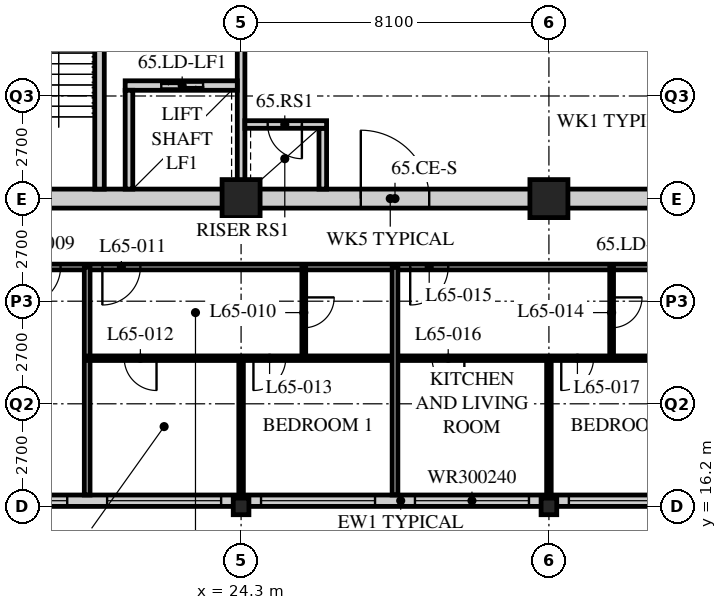
"""IFC4 building model, lengths in metres.
Left out: names, types, materials, properties, quantities, classifications, styles, units other than length and angle.
Written with IfcOpenShell. Run it as: python <this file> out.ifc"""

import sys

from ifc_helpers import new_model, si_unit, direction, frame, frame_2d, origin, origin_2d, place, context, subcontext, project, spatial, rectangle, hollow_rectangle, i_section, extrude, element, fill, save


model = new_model("IFC4")
c1 = context("Model", 3, precision=1e-05, world=origin(), true_north=direction((0.0, 1.0)))
c2 = subcontext(c1, "Body", "Model", "MODEL_VIEW")
j1 = project(units=[si_unit("LENGTHUNIT", "METRE"), si_unit("PLANEANGLEUNIT", "RADIAN")], contexts=[c1])
p1 = place(None, origin())
s1 = spatial("IfcSite", under=j1, at=p1, CompositionType="ELEMENT")
p2 = place(p1, origin())
s2 = spatial("IfcBuilding", under=s1, at=p2, CompositionType="ELEMENT")
p3 = place(p2, frame((0.0, 0.0, 254.1)))
s3 = spatial("IfcBuildingStorey", under=s2, at=p3, CompositionType="ELEMENT", Elevation=254.1)
p4 = place(p3, frame((24.3, 16.2, 0.0), z_axis=(0.0, 0.0, 1.0), x_axis=(1.0, 0.0, 0.0)))
e1 = element("IfcColumn", 1, at=p4, inside=s3, PredefinedType="COLUMN", context=c2, shape_type="SweptSolid", body=[
    extrude(i_section(OverallWidth=0.412, OverallDepth=0.437, WebThickness=0.036, FlangeThickness=0.058, FilletRadius=0.015, at=origin_2d()), origin(), (0.0, 0.0, 1.0), 3.9),
])
p5 = place(p3, frame((24.3, 24.3, 0.0), z_axis=(0.0, 0.0, 1.0), x_axis=(1.0, 0.0, 0.0)))
e2 = element("IfcColumn", 2, at=p5, inside=s3, PredefinedType="COLUMN", context=c2, shape_type="SweptSolid", body=[
    extrude(hollow_rectangle(XDim=1.0, YDim=1.0, WallThickness=0.1, at=origin_2d()), origin(), (0.0, 0.0, 1.0), 3.9),
])
p6 = place(p3, frame((32.4, 16.2, 0.0), z_axis=(0.0, 0.0, 1.0), x_axis=(1.0, 0.0, 0.0)))
e3 = element("IfcColumn", 3, at=p6, inside=s3, PredefinedType="COLUMN", context=c2, shape_type="SweptSolid", body=[
    extrude(i_section(OverallWidth=0.412, OverallDepth=0.437, WebThickness=0.036, FlangeThickness=0.058, FilletRadius=0.015, at=origin_2d()), origin(), (0.0, 0.0, 1.0), 3.9),
])
p7 = place(p3, frame((32.4, 24.3, 0.0), z_axis=(0.0, 0.0, 1.0), x_axis=(1.0, 0.0, 0.0)))
e4 = element("IfcColumn", 4, at=p7, inside=s3, PredefinedType="COLUMN", context=c2, shape_type="SweptSolid", body=[
    extrude(hollow_rectangle(XDim=1.0, YDim=1.0, WallThickness=0.1, at=origin_2d()), origin(), (0.0, 0.0, 1.0), 3.9),
])
p8 = place(p3, frame((8.4, 16.35, 0.0), z_axis=(0.0, 0.0, 1.0), x_axis=(1.0, 0.0, 0.0)))
e5 = element("IfcWall", 5, at=p8, inside=s3, PredefinedType="SOLIDWALL", context=c2, shape_type="SweptSolid", body=[
    extrude(rectangle(XDim=40.2, YDim=0.3, at=frame_2d((20.1, 0.0))), origin(), (0.0, 0.0, 1.0), 3.69),
])
p9 = place(p8, frame((0.225, 0.0, 0.6)))
e6 = element("IfcOpeningElement", 6, at=p9, cuts=e5, PredefinedType="OPENING", context=c2, shape_type="SweptSolid", body=[
    extrude(rectangle(XDim=3.0, YDim=2.4, at=frame_2d((1.5, 1.2))), frame((0.0, 0.16, 0.0), z_axis=(0.0, -1.0, 0.0), x_axis=(1.0, 0.0, 0.0)), (0.0, 0.0, 1.0), 0.32),
])
p10 = place(p8, frame((4.275, 0.0, 0.6)))
e7 = element("IfcOpeningElement", 7, at=p10, cuts=e5, PredefinedType="OPENING", context=c2, shape_type="SweptSolid", body=[
    extrude(rectangle(XDim=3.0, YDim=2.4, at=frame_2d((1.5, 1.2))), frame((0.0, 0.16, 0.0), z_axis=(0.0, -1.0, 0.0), x_axis=(1.0, 0.0, 0.0)), (0.0, 0.0, 1.0), 0.32),
])
p11 = place(p8, frame((8.325, 0.0, 0.6)))
e8 = element("IfcOpeningElement", 8, at=p11, cuts=e5, PredefinedType="OPENING", context=c2, shape_type="SweptSolid", body=[
    extrude(rectangle(XDim=3.0, YDim=2.4, at=frame_2d((1.5, 1.2))), frame((0.0, 0.16, 0.0), z_axis=(0.0, -1.0, 0.0), x_axis=(1.0, 0.0, 0.0)), (0.0, 0.0, 1.0), 0.32),
])
p12 = place(p8, frame((12.375, 0.0, 0.6)))
e9 = element("IfcOpeningElement", 9, at=p12, cuts=e5, PredefinedType="OPENING", context=c2, shape_type="SweptSolid", body=[
    extrude(rectangle(XDim=3.0, YDim=2.4, at=frame_2d((1.5, 1.2))), frame((0.0, 0.16, 0.0), z_axis=(0.0, -1.0, 0.0), x_axis=(1.0, 0.0, 0.0)), (0.0, 0.0, 1.0), 0.32),
])
p13 = place(p8, frame((16.425, 0.0, 0.6)))
e10 = element("IfcOpeningElement", 10, at=p13, cuts=e5, PredefinedType="OPENING", context=c2, shape_type="SweptSolid", body=[
    extrude(rectangle(XDim=3.0, YDim=2.4, at=frame_2d((1.5, 1.2))), frame((0.0, 0.16, 0.0), z_axis=(0.0, -1.0, 0.0), x_axis=(1.0, 0.0, 0.0)), (0.0, 0.0, 1.0), 0.32),
])
p14 = place(p8, frame((20.475, 0.0, 0.6)))
e11 = element("IfcOpeningElement", 11, at=p14, cuts=e5, PredefinedType="OPENING", context=c2, shape_type="SweptSolid", body=[
    extrude(rectangle(XDim=3.0, YDim=2.4, at=frame_2d((1.5, 1.2))), frame((0.0, 0.16, 0.0), z_axis=(0.0, -1.0, 0.0), x_axis=(1.0, 0.0, 0.0)), (0.0, 0.0, 1.0), 0.32),
])
p15 = place(p8, frame((24.525, 0.0, 0.6)))
e12 = element("IfcOpeningElement", 12, at=p15, cuts=e5, PredefinedType="OPENING", context=c2, shape_type="SweptSolid", body=[
    extrude(rectangle(XDim=3.0, YDim=2.4, at=frame_2d((1.5, 1.2))), frame((0.0, 0.16, 0.0), z_axis=(0.0, -1.0, 0.0), x_axis=(1.0, 0.0, 0.0)), (0.0, 0.0, 1.0), 0.32),
])
p16 = place(p8, frame((28.575, 0.0, 0.6)))
e13 = element("IfcOpeningElement", 13, at=p16, cuts=e5, PredefinedType="OPENING", context=c2, shape_type="SweptSolid", body=[
    extrude(rectangle(XDim=3.0, YDim=2.4, at=frame_2d((1.5, 1.2))), frame((0.0, 0.16, 0.0), z_axis=(0.0, -1.0, 0.0), x_axis=(1.0, 0.0, 0.0)), (0.0, 0.0, 1.0), 0.32),
])
p17 = place(p8, frame((32.625, 0.0, 0.6)))
e14 = element("IfcOpeningElement", 14, at=p17, cuts=e5, PredefinedType="OPENING", context=c2, shape_type="SweptSolid", body=[
    extrude(rectangle(XDim=3.0, YDim=2.4, at=frame_2d((1.5, 1.2))), frame((0.0, 0.16, 0.0), z_axis=(0.0, -1.0, 0.0), x_axis=(1.0, 0.0, 0.0)), (0.0, 0.0, 1.0), 0.32),
])
p18 = place(p8, frame((36.675, 0.0, 0.6)))
e15 = element("IfcOpeningElement", 15, at=p18, cuts=e5, PredefinedType="OPENING", context=c2, shape_type="SweptSolid", body=[
    extrude(rectangle(XDim=3.0, YDim=2.4, at=frame_2d((1.5, 1.2))), frame((0.0, 0.16, 0.0), z_axis=(0.0, -1.0, 0.0), x_axis=(1.0, 0.0, 0.0)), (0.0, 0.0, 1.0), 0.32),
])
p19 = place(p3, frame((12.15, 22.5, 0.0), z_axis=(0.0, 0.0, 1.0), x_axis=(1.0, 0.0, 0.0)))
e16 = element("IfcWall", 16, at=p19, inside=s3, PredefinedType="PARTITIONING", context=c2, shape_type="SweptSolid", body=[
    extrude(rectangle(XDim=24.3, YDim=0.15, at=frame_2d((12.15, 0.0))), origin(), (0.0, 0.0, 1.0), 3.69),
])
p20 = place(p19, frame((6.4, 0.0, 0.0)))
e17 = element("IfcOpeningElement", 17, at=p20, cuts=e16, PredefinedType="OPENING", context=c2, shape_type="SweptSolid", body=[
    extrude(rectangle(XDim=1.0, YDim=2.1, at=frame_2d((0.5, 1.05))), frame((0.0, 0.085, 0.0), z_axis=(0.0, -1.0, 0.0), x_axis=(1.0, 0.0, 0.0)), (0.0, 0.0, 1.0), 0.17),
])
p21 = place(p19, frame((8.5, 0.0, 0.0)))
e18 = element("IfcOpeningElement", 18, at=p21, cuts=e16, PredefinedType="OPENING", context=c2, shape_type="SweptSolid", body=[
    extrude(rectangle(XDim=1.0, YDim=2.1, at=frame_2d((0.5, 1.05))), frame((0.0, 0.085, 0.0), z_axis=(0.0, -1.0, 0.0), x_axis=(1.0, 0.0, 0.0)), (0.0, 0.0, 1.0), 0.17),
])
p22 = place(p19, frame((16.6, 0.0, 0.0)))
e19 = element("IfcOpeningElement", 19, at=p22, cuts=e16, PredefinedType="OPENING", context=c2, shape_type="SweptSolid", body=[
    extrude(rectangle(XDim=1.0, YDim=2.1, at=frame_2d((0.5, 1.05))), frame((0.0, 0.085, 0.0), z_axis=(0.0, -1.0, 0.0), x_axis=(1.0, 0.0, 0.0)), (0.0, 0.0, 1.0), 0.17),
])
p23 = place(p19, frame((2.625, 0.0, 0.0)))
e20 = element("IfcOpeningElement", 20, at=p23, cuts=e16, PredefinedType="OPENING", context=c2, shape_type="SweptSolid", body=[
    extrude(rectangle(XDim=1.0, YDim=2.1, at=frame_2d((0.5, 1.05))), frame((0.0, 0.085, 0.0), z_axis=(0.0, -1.0, 0.0), x_axis=(1.0, 0.0, 0.0)), (0.0, 0.0, 1.0), 0.17),
])
p24 = place(p3, frame((20.25, 22.5, 0.0), z_axis=(0.0, 0.0, 1.0), x_axis=(0.0, -1.0, 0.0)))
e21 = element("IfcWall", 21, at=p24, inside=s3, PredefinedType="PARTITIONING", context=c2, shape_type="SweptSolid", body=[
    extrude(rectangle(XDim=6.0, YDim=0.15, at=frame_2d((3.0, 0.0))), origin(), (0.0, 0.0, 1.0), 3.69),
])
p25 = place(p3, frame((20.25, 20.1, 0.0), z_axis=(0.0, 0.0, 1.0), x_axis=(1.0, 0.0, 0.0)))
e22 = element("IfcWall", 22, at=p25, inside=s3, PredefinedType="PARTITIONING", context=c2, shape_type="SweptSolid", body=[
    extrude(rectangle(XDim=16.2, YDim=0.12, at=frame_2d((8.1, 0.0))), origin(), (0.0, 0.0, 1.0), 3.69),
])
p26 = place(p25, frame((0.975, 0.0, 0.0)))
e23 = element("IfcOpeningElement", 23, at=p26, cuts=e22, PredefinedType="OPENING", context=c2, shape_type="SweptSolid", body=[
    extrude(rectangle(XDim=0.85, YDim=2.1, at=frame_2d((0.425, 1.05))), frame((0.0, 0.07, 0.0), z_axis=(0.0, -1.0, 0.0), x_axis=(1.0, 0.0, 0.0)), (0.0, 0.0, 1.0), 0.14),
])
p27 = place(p25, frame((4.375, 0.0, 0.0)))
e24 = element("IfcOpeningElement", 24, at=p27, cuts=e22, PredefinedType="OPENING", context=c2, shape_type="SweptSolid", body=[
    extrude(rectangle(XDim=0.85, YDim=2.1, at=frame_2d((0.425, 1.05))), frame((0.0, 0.07, 0.0), z_axis=(0.0, -1.0, 0.0), x_axis=(1.0, 0.0, 0.0)), (0.0, 0.0, 1.0), 0.14),
])
p28 = place(p25, frame((9.075, 0.0, 0.0)))
e25 = element("IfcOpeningElement", 25, at=p28, cuts=e22, PredefinedType="OPENING", context=c2, shape_type="SweptSolid", body=[
    extrude(rectangle(XDim=0.85, YDim=2.1, at=frame_2d((0.425, 1.05))), frame((0.0, 0.07, 0.0), z_axis=(0.0, -1.0, 0.0), x_axis=(1.0, 0.0, 0.0)), (0.0, 0.0, 1.0), 0.14),
])
p29 = place(p25, frame((12.475, 0.0, 0.0)))
e26 = element("IfcOpeningElement", 26, at=p29, cuts=e22, PredefinedType="OPENING", context=c2, shape_type="SweptSolid", body=[
    extrude(rectangle(XDim=0.85, YDim=2.1, at=frame_2d((0.425, 1.05))), frame((0.0, 0.07, 0.0), z_axis=(0.0, -1.0, 0.0), x_axis=(1.0, 0.0, 0.0)), (0.0, 0.0, 1.0), 0.14),
])
p30 = place(p3, frame((25.95, 22.5, 0.0), z_axis=(0.0, 0.0, 1.0), x_axis=(0.0, -1.0, 0.0)))
e27 = element("IfcWall", 27, at=p30, inside=s3, PredefinedType="PARTITIONING", context=c2, shape_type="SweptSolid", body=[
    extrude(rectangle(XDim=2.4, YDim=0.1, at=frame_2d((1.2, 0.0))), origin(), (0.0, 0.0, 1.0), 3.69),
])
p31 = place(p30, frame((0.8, 0.0, 0.0)))
e28 = element("IfcOpeningElement", 28, at=p31, cuts=e27, PredefinedType="OPENING", context=c2, shape_type="SweptSolid", body=[
    extrude(rectangle(XDim=0.8, YDim=2.1, at=frame_2d((0.4, 1.05))), frame((0.0, 0.06, 0.0), z_axis=(0.0, -1.0, 0.0), x_axis=(1.0, 0.0, 0.0)), (0.0, 0.0, 1.0), 0.12),
])
p32 = place(p3, frame((24.3, 20.1, 0.0), z_axis=(0.0, 0.0, 1.0), x_axis=(0.0, -1.0, 0.0)))
e29 = element("IfcWall", 29, at=p32, inside=s3, PredefinedType="PARTITIONING", context=c2, shape_type="SweptSolid", body=[
    extrude(rectangle(XDim=3.6, YDim=0.12, at=frame_2d((1.8, 0.0))), origin(), (0.0, 0.0, 1.0), 3.078),
])
p33 = place(p3, frame((28.35, 22.5, 0.0), z_axis=(0.0, 0.0, 1.0), x_axis=(0.0, -1.0, 0.0)))
e30 = element("IfcWall", 30, at=p33, inside=s3, PredefinedType="PARTITIONING", context=c2, shape_type="SweptSolid", body=[
    extrude(rectangle(XDim=6.0, YDim=0.15, at=frame_2d((3.0, 0.0))), origin(), (0.0, 0.0, 1.0), 3.69),
])
p34 = place(p3, frame((34.05, 22.5, 0.0), z_axis=(0.0, 0.0, 1.0), x_axis=(0.0, -1.0, 0.0)))
e31 = element("IfcWall", 31, at=p34, inside=s3, PredefinedType="PARTITIONING", context=c2, shape_type="SweptSolid", body=[
    extrude(rectangle(XDim=2.4, YDim=0.1, at=frame_2d((1.2, 0.0))), origin(), (0.0, 0.0, 1.0), 3.69),
])
p35 = place(p34, frame((0.8, 0.0, 0.0)))
e32 = element("IfcOpeningElement", 32, at=p35, cuts=e31, PredefinedType="OPENING", context=c2, shape_type="SweptSolid", body=[
    extrude(rectangle(XDim=0.8, YDim=2.1, at=frame_2d((0.4, 1.05))), frame((0.0, 0.06, 0.0), z_axis=(0.0, -1.0, 0.0), x_axis=(1.0, 0.0, 0.0)), (0.0, 0.0, 1.0), 0.12),
])
p36 = place(p3, frame((32.4, 20.1, 0.0), z_axis=(0.0, 0.0, 1.0), x_axis=(0.0, -1.0, 0.0)))
e33 = element("IfcWall", 33, at=p36, inside=s3, PredefinedType="PARTITIONING", context=c2, shape_type="SweptSolid", body=[
    extrude(rectangle(XDim=3.6, YDim=0.12, at=frame_2d((1.8, 0.0))), origin(), (0.0, 0.0, 1.0), 3.078),
])
p37 = place(p3, frame((15.95, 24.3, 0.0), z_axis=(0.0, 0.0, 1.0), x_axis=(1.0, 0.0, 0.0)))
e34 = element("IfcWall", 34, at=p37, inside=s3, PredefinedType="SOLIDWALL", context=c2, shape_type="SweptSolid", body=[
    extrude(rectangle(XDim=24.55, YDim=0.5, at=frame_2d((12.275, 0.0))), origin(), (0.0, 0.0, 1.0), 3.04),
])
p38 = place(p37, frame((11.5, 0.0, 0.0)))
e35 = element("IfcOpeningElement", 35, at=p38, cuts=e34, PredefinedType="OPENING", context=c2, shape_type="SweptSolid", body=[
    extrude(rectangle(XDim=1.8, YDim=2.4, at=frame_2d((0.9, 1.2))), frame((0.0, 0.26, 0.0), z_axis=(0.0, -1.0, 0.0), x_axis=(1.0, 0.0, 0.0)), (0.0, 0.0, 1.0), 0.52),
])
p39 = place(p3, frame((24.3, 24.55, 0.0), z_axis=(0.0, 0.0, 1.0), x_axis=(0.0, 1.0, 0.0)))
e36 = element("IfcWall", 36, at=p39, inside=s3, PredefinedType="SOLIDWALL", context=c2, shape_type="SweptSolid", body=[
    extrude(rectangle(XDim=7.75, YDim=0.2, at=frame_2d((3.875, 0.0))), origin(), (0.0, 0.0, 1.0), 3.078),
])
p40 = place(p39, frame((4.6, 0.0, 0.0)))
e37 = element("IfcOpeningElement", 37, at=p40, cuts=e36, PredefinedType="OPENING", context=c2, shape_type="SweptSolid", body=[
    extrude(rectangle(XDim=1.2, YDim=2.1, at=frame_2d((0.6, 1.05))), frame((0.0, 0.11, 0.0), z_axis=(0.0, -1.0, 0.0), x_axis=(1.0, 0.0, 0.0)), (0.0, 0.0, 1.0), 0.22),
])
p41 = place(p3, frame((20.575, 24.55, 0.0), z_axis=(0.0, 0.0, 1.0), x_axis=(0.0, 1.0, 0.0)))
e38 = element("IfcWall", 38, at=p41, inside=s3, PredefinedType="SOLIDWALL", context=c2, shape_type="SweptSolid", body=[
    extrude(rectangle(XDim=7.75, YDim=0.25, at=frame_2d((3.875, 0.0))), origin(), (0.0, 0.0, 1.0), 3.69),
])
p42 = place(p41, frame((6.2, 0.0, 0.0)))
e39 = element("IfcOpeningElement", 39, at=p42, cuts=e38, PredefinedType="OPENING", context=c2, shape_type="SweptSolid", body=[
    extrude(rectangle(XDim=1.2, YDim=2.1, at=frame_2d((0.6, 1.05))), frame((0.0, 0.135, 0.0), z_axis=(0.0, -1.0, 0.0), x_axis=(1.0, 0.0, 0.0)), (0.0, 0.0, 1.0), 0.27),
])
p43 = place(p3, frame((21.25, 27.275, 0.0), z_axis=(0.0, 0.0, 1.0), x_axis=(1.0, 0.0, 0.0)))
e40 = element("IfcWall", 40, at=p43, inside=s3, PredefinedType="SOLIDWALL", context=c2, shape_type="SweptSolid", body=[
    extrude(rectangle(XDim=2.95, YDim=0.25, at=frame_2d((1.475, 0.0))), origin(), (0.0, 0.0, 1.0), 3.69),
])
p44 = place(p43, frame((0.95, 0.0, 0.0)))
e41 = element("IfcOpeningElement", 41, at=p44, cuts=e40, PredefinedType="OPENING", context=c2, shape_type="SweptSolid", body=[
    extrude(rectangle(XDim=1.1, YDim=2.4, at=frame_2d((0.55, 1.2))), frame((0.0, 0.135, 0.0), z_axis=(0.0, -1.0, 0.0), x_axis=(1.0, 0.0, 0.0)), (0.0, 0.0, 1.0), 0.27),
])
p45 = place(p3, frame((21.35, 24.55, 0.0), z_axis=(0.0, 0.0, 1.0), x_axis=(0.0, 1.0, 0.0)))
e42 = element("IfcWall", 42, at=p45, inside=s3, PredefinedType="SOLIDWALL", context=c2, shape_type="SweptSolid", body=[
    extrude(rectangle(XDim=2.6, YDim=0.2, at=frame_2d((1.3, 0.0))), origin(), (0.0, 0.0, 1.0), 3.69),
])
p46 = place(p3, frame((26.45, 24.55, 0.0), z_axis=(0.0, 0.0, 1.0), x_axis=(0.0, 1.0, 0.0)))
e43 = element("IfcWall", 43, at=p46, inside=s3, PredefinedType="SOLIDWALL", context=c2, shape_type="SweptSolid", body=[
    extrude(rectangle(XDim=1.6, YDim=0.2, at=frame_2d((0.8, 0.0))), origin(), (0.0, 0.0, 1.0), 3.69),
])
p47 = place(p3, frame((24.4, 26.25, 0.0), z_axis=(0.0, 0.0, 1.0), x_axis=(1.0, 0.0, 0.0)))
e44 = element("IfcWall", 44, at=p47, inside=s3, PredefinedType="SOLIDWALL", context=c2, shape_type="SweptSolid", body=[
    extrude(rectangle(XDim=2.15, YDim=0.2, at=frame_2d((1.075, 0.0))), origin(), (0.0, 0.0, 1.0), 3.69),
])
p48 = place(p47, frame((0.6, 0.0, 0.0)))
e45 = element("IfcOpeningElement", 45, at=p48, cuts=e44, PredefinedType="OPENING", context=c2, shape_type="SweptSolid", body=[
    extrude(rectangle(XDim=0.9, YDim=2.1, at=frame_2d((0.45, 1.05))), frame((0.0, 0.11, 0.0), z_axis=(0.0, -1.0, 0.0), x_axis=(1.0, 0.0, 0.0)), (0.0, 0.0, 1.0), 0.22),
])
p49 = place(p11, origin())
e46 = element("IfcWindow", 46, at=p49, inside=s3, PartitioningType="SINGLE_PANEL", PredefinedType="WINDOW", context=c2, shape_type="SweptSolid", body=[
    extrude(rectangle(XDim=3.0, YDim=2.4, at=frame_2d((1.5, 1.2))), frame((0.0, 0.03, 0.0), z_axis=(0.0, -1.0, 0.0), x_axis=(1.0, 0.0, 0.0)), (0.0, 0.0, 1.0), 0.06),
])
fill(e8, e46)
p50 = place(p12, origin())
e47 = element("IfcWindow", 47, at=p50, inside=s3, PartitioningType="SINGLE_PANEL", PredefinedType="WINDOW", context=c2, shape_type="SweptSolid", body=[
    extrude(rectangle(XDim=3.0, YDim=2.4, at=frame_2d((1.5, 1.2))), frame((0.0, 0.03, 0.0), z_axis=(0.0, -1.0, 0.0), x_axis=(1.0, 0.0, 0.0)), (0.0, 0.0, 1.0), 0.06),
])
fill(e9, e47)
p51 = place(p13, origin())
e48 = element("IfcWindow", 48, at=p51, inside=s3, PartitioningType="SINGLE_PANEL", PredefinedType="WINDOW", context=c2, shape_type="SweptSolid", body=[
    extrude(rectangle(XDim=3.0, YDim=2.4, at=frame_2d((1.5, 1.2))), frame((0.0, 0.03, 0.0), z_axis=(0.0, -1.0, 0.0), x_axis=(1.0, 0.0, 0.0)), (0.0, 0.0, 1.0), 0.06),
])
fill(e10, e48)
p52 = place(p14, origin())
e49 = element("IfcWindow", 49, at=p52, inside=s3, PartitioningType="SINGLE_PANEL", PredefinedType="WINDOW", context=c2, shape_type="SweptSolid", body=[
    extrude(rectangle(XDim=3.0, YDim=2.4, at=frame_2d((1.5, 1.2))), frame((0.0, 0.03, 0.0), z_axis=(0.0, -1.0, 0.0), x_axis=(1.0, 0.0, 0.0)), (0.0, 0.0, 1.0), 0.06),
])
fill(e11, e49)
p53 = place(p15, origin())
e50 = element("IfcWindow", 50, at=p53, inside=s3, PartitioningType="SINGLE_PANEL", PredefinedType="WINDOW", context=c2, shape_type="SweptSolid", body=[
    extrude(rectangle(XDim=3.0, YDim=2.4, at=frame_2d((1.5, 1.2))), frame((0.0, 0.03, 0.0), z_axis=(0.0, -1.0, 0.0), x_axis=(1.0, 0.0, 0.0)), (0.0, 0.0, 1.0), 0.06),
])
fill(e12, e50)
p54 = place(p20, origin())
e51 = element("IfcDoor", 51, at=p54, inside=s3, OperationType="SINGLE_SWING_RIGHT", PredefinedType="DOOR", context=c2, shape_type="SweptSolid", body=[
    extrude(rectangle(XDim=1.0, YDim=2.1, at=frame_2d((0.5, 1.05))), frame((0.0, 0.025, 0.0), z_axis=(0.0, -1.0, 0.0), x_axis=(1.0, 0.0, 0.0)), (0.0, 0.0, 1.0), 0.05),
])
fill(e17, e51)
p55 = place(p31, origin())
e52 = element("IfcDoor", 52, at=p55, inside=s3, OperationType="SINGLE_SWING_LEFT", PredefinedType="DOOR", context=c2, shape_type="SweptSolid", body=[
    extrude(rectangle(XDim=0.8, YDim=2.1, at=frame_2d((0.4, 1.05))), frame((0.0, 0.025, 0.0), z_axis=(0.0, -1.0, 0.0), x_axis=(1.0, 0.0, 0.0)), (0.0, 0.0, 1.0), 0.05),
])
fill(e28, e52)
p56 = place(p21, origin())
e53 = element("IfcDoor", 53, at=p56, inside=s3, OperationType="SINGLE_SWING_RIGHT", PredefinedType="DOOR", context=c2, shape_type="SweptSolid", body=[
    extrude(rectangle(XDim=1.0, YDim=2.1, at=frame_2d((0.5, 1.05))), frame((0.0, 0.025, 0.0), z_axis=(0.0, -1.0, 0.0), x_axis=(1.0, 0.0, 0.0)), (0.0, 0.0, 1.0), 0.05),
])
fill(e18, e53)
p57 = place(p26, origin())
e54 = element("IfcDoor", 54, at=p57, inside=s3, OperationType="SINGLE_SWING_LEFT", PredefinedType="DOOR", context=c2, shape_type="SweptSolid", body=[
    extrude(rectangle(XDim=0.85, YDim=2.1, at=frame_2d((0.425, 1.05))), frame((0.0, 0.025, 0.0), z_axis=(0.0, -1.0, 0.0), x_axis=(1.0, 0.0, 0.0)), (0.0, 0.0, 1.0), 0.05),
])
fill(e23, e54)
p58 = place(p27, origin())
e55 = element("IfcDoor", 55, at=p58, inside=s3, OperationType="SINGLE_SWING_RIGHT", PredefinedType="DOOR", context=c2, shape_type="SweptSolid", body=[
    extrude(rectangle(XDim=0.85, YDim=2.1, at=frame_2d((0.425, 1.05))), frame((0.0, 0.025, 0.0), z_axis=(0.0, -1.0, 0.0), x_axis=(1.0, 0.0, 0.0)), (0.0, 0.0, 1.0), 0.05),
])
fill(e24, e55)
p59 = place(p35, origin())
e56 = element("IfcDoor", 56, at=p59, inside=s3, OperationType="SINGLE_SWING_LEFT", PredefinedType="DOOR", context=c2, shape_type="SweptSolid", body=[
    extrude(rectangle(XDim=0.8, YDim=2.1, at=frame_2d((0.4, 1.05))), frame((0.0, 0.025, 0.0), z_axis=(0.0, -1.0, 0.0), x_axis=(1.0, 0.0, 0.0)), (0.0, 0.0, 1.0), 0.05),
])
fill(e32, e56)
p60 = place(p22, origin())
e57 = element("IfcDoor", 57, at=p60, inside=s3, OperationType="SINGLE_SWING_RIGHT", PredefinedType="DOOR", context=c2, shape_type="SweptSolid", body=[
    extrude(rectangle(XDim=1.0, YDim=2.1, at=frame_2d((0.5, 1.05))), frame((0.0, 0.025, 0.0), z_axis=(0.0, -1.0, 0.0), x_axis=(1.0, 0.0, 0.0)), (0.0, 0.0, 1.0), 0.05),
])
fill(e19, e57)
p61 = place(p28, origin())
e58 = element("IfcDoor", 58, at=p61, inside=s3, OperationType="SINGLE_SWING_LEFT", PredefinedType="DOOR", context=c2, shape_type="SweptSolid", body=[
    extrude(rectangle(XDim=0.85, YDim=2.1, at=frame_2d((0.425, 1.05))), frame((0.0, 0.025, 0.0), z_axis=(0.0, -1.0, 0.0), x_axis=(1.0, 0.0, 0.0)), (0.0, 0.0, 1.0), 0.05),
])
fill(e25, e58)
p62 = place(p29, origin())
e59 = element("IfcDoor", 59, at=p62, inside=s3, OperationType="SINGLE_SWING_RIGHT", PredefinedType="DOOR", context=c2, shape_type="SweptSolid", body=[
    extrude(rectangle(XDim=0.85, YDim=2.1, at=frame_2d((0.425, 1.05))), frame((0.0, 0.025, 0.0), z_axis=(0.0, -1.0, 0.0), x_axis=(1.0, 0.0, 0.0)), (0.0, 0.0, 1.0), 0.05),
])
fill(e26, e59)
p63 = place(p48, origin())
e60 = element("IfcDoor", 60, at=p63, inside=s3, OperationType="SINGLE_SWING_LEFT", PredefinedType="DOOR", context=c2, shape_type="SweptSolid", body=[
    extrude(rectangle(XDim=0.9, YDim=2.1, at=frame_2d((0.45, 1.05))), frame((0.0, 0.025, 0.0), z_axis=(0.0, -1.0, 0.0), x_axis=(1.0, 0.0, 0.0)), (0.0, 0.0, 1.0), 0.05),
])
fill(e45, e60)
p64 = place(p44, origin())
e61 = element("IfcDoor", 61, at=p64, inside=s3, OperationType="DOUBLE_DOOR_SLIDING", PredefinedType="DOOR", context=c2, shape_type="SweptSolid", body=[
    extrude(rectangle(XDim=1.1, YDim=2.4, at=frame_2d((0.55, 1.2))), frame((0.0, 0.025, 0.0), z_axis=(0.0, -1.0, 0.0), x_axis=(1.0, 0.0, 0.0)), (0.0, 0.0, 1.0), 0.05),
])
fill(e41, e61)
p65 = place(p38, origin())
e62 = element("IfcDoor", 62, at=p65, inside=s3, OperationType="DOUBLE_DOOR_SINGLE_SWING", PredefinedType="DOOR", context=c2, shape_type="SweptSolid", body=[
    extrude(rectangle(XDim=1.8, YDim=2.4, at=frame_2d((0.9, 1.2))), frame((0.0, 0.025, 0.0), z_axis=(0.0, -1.0, 0.0), x_axis=(1.0, 0.0, 0.0)), (0.0, 0.0, 1.0), 0.05),
])
fill(e35, e62)
save(model, sys.argv[1])
